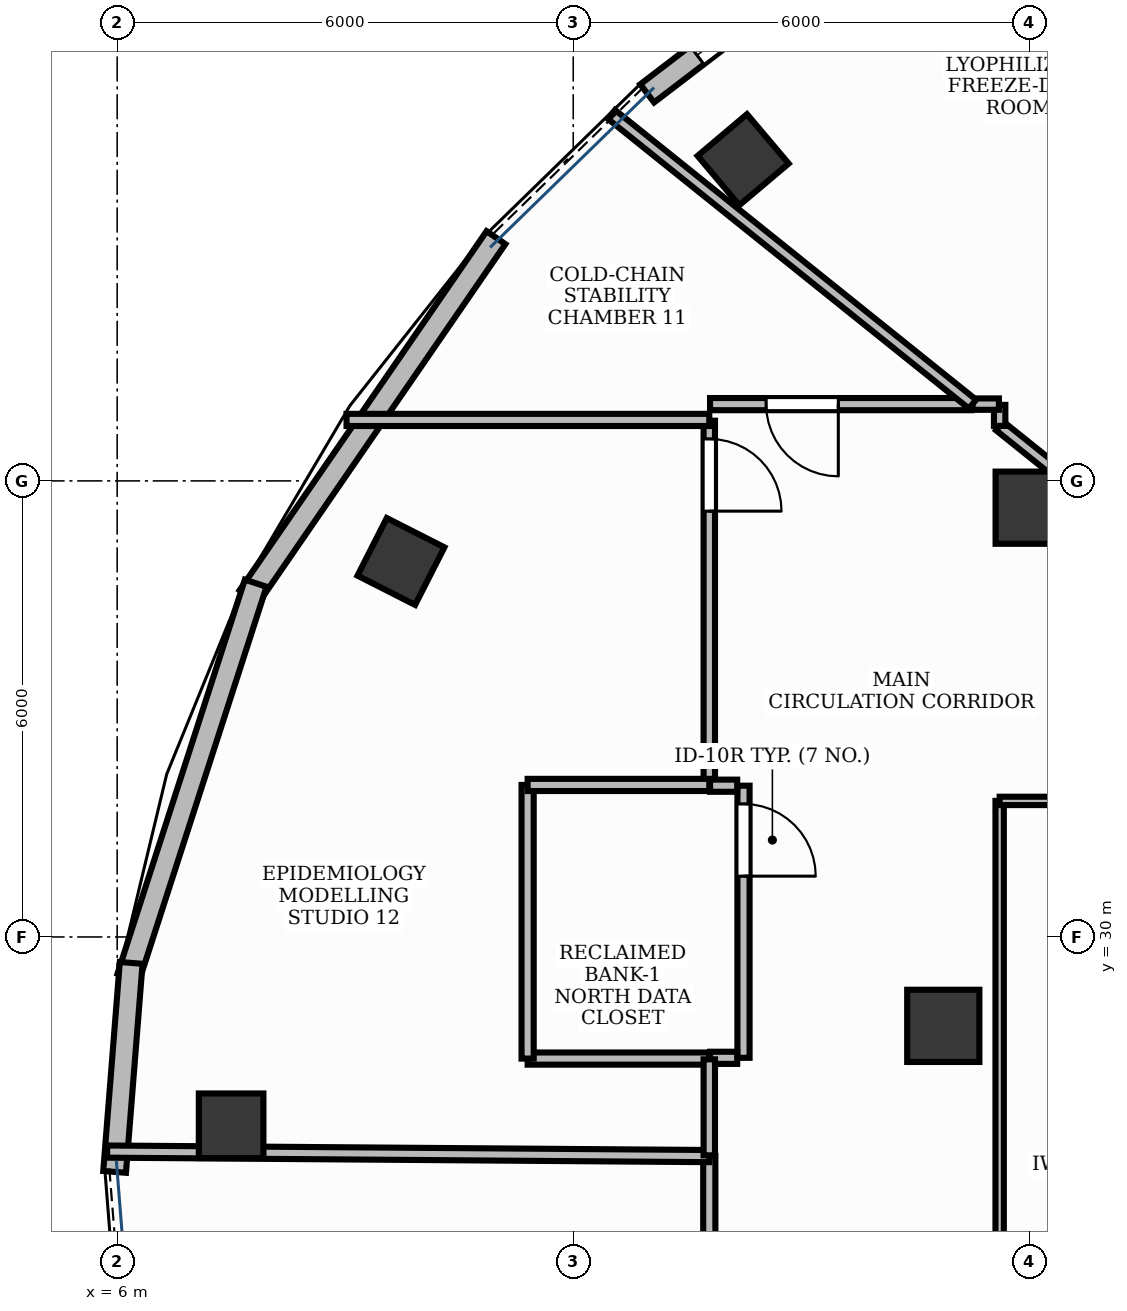
"""IFC4 building model, lengths in metres.
Left out: names, types, materials, properties, quantities, classifications, styles, units other than length and angle.
Written with IfcOpenShell. Run it as: python <this file> out.ifc"""

import sys

from ifc_helpers import new_model, si_unit, direction, frame, frame_2d, origin, origin_2d, place, context, subcontext, project, spatial, rectangle, extrude, element, fill, save


model = new_model("IFC4")
c1 = context("Model", 3, precision=1e-05, world=origin(), true_north=direction((0.0, 1.0)))
c2 = subcontext(c1, "Body", "Model", "MODEL_VIEW")
j1 = project(units=[si_unit("LENGTHUNIT", "METRE"), si_unit("PLANEANGLEUNIT", "RADIAN")], contexts=[c1])
p1 = place(None, origin())
s1 = spatial("IfcSite", under=j1, at=p1, CompositionType="ELEMENT")
p2 = place(p1, origin())
s2 = spatial("IfcBuilding", under=s1, at=p2, CompositionType="ELEMENT")
p3 = place(p2, frame((0.0, 0.0, 243.6)))
s3 = spatial("IfcBuildingStorey", under=s2, at=p3, CompositionType="ELEMENT", Elevation=243.6)
for number, where, z_axis, x_axis in (
    (1, (14.235, 40.225, -0.0), (0.0, 0.0, 1.0), (0.764, 0.645, 0.0)),
    (2, (9.733, 34.94, -0.0), (0.0, 0.0, 1.0), (0.453, 0.891, 0.0)),
):
    element("IfcColumn", number, at=place(p3, frame(where, z_axis=z_axis, x_axis=x_axis)), inside=s3, PredefinedType="COLUMN", context=c2, shape_type="SweptSolid", body=[
        extrude(rectangle(XDim=0.85, YDim=0.85, at=origin_2d()), origin(), (0.0, 0.0, 1.0), 3.901),
    ])
p4 = place(p3, frame((18.031, 35.647, -0.0), z_axis=(0.0, 0.0, 1.0), x_axis=(1.0, 0.0, 0.0)))
e3 = element("IfcColumn", 3, at=p4, inside=s3, PredefinedType="COLUMN", context=c2, shape_type="SweptSolid", body=[
    extrude(rectangle(XDim=0.95, YDim=0.95, at=origin_2d()), origin(), (0.0, 0.0, 1.0), 3.901),
])
p5 = place(p3, frame((7.499, 27.516, -0.0), z_axis=(0.0, 0.0, 1.0), x_axis=(0.0, 1.0, 0.0)))
e4 = element("IfcColumn", 4, at=p5, inside=s3, PredefinedType="COLUMN", context=c2, shape_type="SweptSolid", body=[
    extrude(rectangle(XDim=0.85, YDim=0.85, at=origin_2d()), origin(), (0.0, 0.0, 1.0), 3.901),
])
p6 = place(p3, frame((16.868, 28.83, -0.0), z_axis=(0.0, 0.0, 1.0), x_axis=(1.0, 0.0, 0.0)))
e5 = element("IfcColumn", 5, at=p6, inside=s3, PredefinedType="COLUMN", context=c2, shape_type="SweptSolid", body=[
    extrude(rectangle(XDim=0.95, YDim=0.95, at=origin_2d()), origin(), (0.0, 0.0, 1.0), 3.901),
])
p7 = place(p3, frame((15.477, 43.013, 0.0), z_axis=(0.0, 0.0, 1.0), x_axis=(-0.794379815394, -0.607421360255, 0.0)))
e6 = element("IfcWall", 6, at=p7, inside=s3, PredefinedType="STANDARD", context=c2, shape_type="SweptSolid", body=[
    extrude(rectangle(XDim=3.152, YDim=0.3, at=frame_2d((1.576, 0.0))), origin(), (0.0, 0.0, 1.0), 3.9),
])
p8 = place(p7, frame((0.826, 0.0, 0.95)))
e7 = element("IfcOpeningElement", 7, at=p8, cuts=e6, PredefinedType="OPENING", context=c2, shape_type="SweptSolid", body=[
    extrude(rectangle(XDim=1.5, YDim=1.8, at=frame_2d((0.75, 0.9))), frame((0.0, 0.165, 0.0), z_axis=(0.0, -1.0, 0.0), x_axis=(1.0, 0.0, 0.0)), (0.0, 0.0, 1.0), 0.33),
])
p9 = place(p3, frame((10.984, 39.2, 0.0), z_axis=(0.0, 0.0, 1.0), x_axis=(-0.566669772846, -0.823945003349, 0.0)))
e8 = element("IfcWall", 8, at=p9, inside=s3, PredefinedType="STANDARD", context=c2, shape_type="SweptSolid", body=[
    extrude(rectangle(XDim=5.734, YDim=0.3, at=frame_2d((2.867, 0.0))), origin(), (0.0, 0.0, 1.0), 3.47),
])
p10 = place(p3, frame((7.822, 34.654, 0.0), z_axis=(0.0, 0.0, 1.0), x_axis=(-0.307501658213, -0.951547544895, 0.0)))
e9 = element("IfcWall", 9, at=p10, inside=s3, PredefinedType="STANDARD", context=c2, shape_type="SweptSolid", body=[
    extrude(rectangle(XDim=5.447, YDim=0.3, at=frame_2d((2.724, 0.0))), origin(), (0.0, 0.0, 1.0), 3.47),
])
p11 = place(p3, frame((6.184, 29.659, 0.0), z_axis=(0.0, 0.0, 1.0), x_axis=(-0.079045093233, -0.996871041427, 0.0)))
e10 = element("IfcWall", 10, at=p11, inside=s3, PredefinedType="STANDARD", context=c2, shape_type="SweptSolid", body=[
    extrude(rectangle(XDim=2.758, YDim=0.3, at=frame_2d((1.379, 0.0))), origin(), (0.0, 0.0, 1.0), 3.47),
])
p12 = place(p3, frame((14.24, 31.99, 0.0), z_axis=(0.0, 0.0, 1.0), x_axis=(0.0, -1.0, 0.0)))
e11 = element("IfcWall", 11, at=p12, inside=s3, PredefinedType="PARTITIONING", context=c2, shape_type="SweptSolid", body=[
    extrude(rectangle(XDim=3.58, YDim=0.16, at=frame_2d((1.79, 0.0))), origin(), (0.0, 0.0, 1.0), 2.91),
])
p13 = place(p12, frame((0.24, 0.0, 0.0)))
e12 = element("IfcOpeningElement", 12, at=p13, cuts=e11, PredefinedType="OPENING", context=c2, shape_type="SweptSolid", body=[
    extrude(rectangle(XDim=0.95, YDim=2.15, at=frame_2d((0.475, 1.075))), frame((0.0, 0.095, 0.0), z_axis=(0.0, -1.0, 0.0), x_axis=(1.0, 0.0, 0.0)), (0.0, 0.0, 1.0), 0.19),
])
p14 = place(p3, frame((13.79, 27.117, 0.0), z_axis=(0.0, 0.0, 1.0), x_axis=(0.0, -1.0, 0.0)))
e13 = element("IfcWall", 13, at=p14, inside=s3, PredefinedType="PARTITIONING", context=c2, shape_type="SweptSolid", body=[
    extrude(rectangle(XDim=11.826, YDim=0.16, at=frame_2d((5.913, 0.0))), origin(), (0.0, 0.0, 1.0), 2.91),
])
p15 = place(p14, frame((5.174, 0.0, 0.0)))
e14 = element("IfcOpeningElement", 14, at=p15, cuts=e13, PredefinedType="OPENING", context=c2, shape_type="SweptSolid", body=[
    extrude(rectangle(XDim=0.95, YDim=2.15, at=frame_2d((0.475, 1.075))), frame((0.0, 0.095, 0.0), z_axis=(0.0, -1.0, 0.0), x_axis=(1.0, 0.0, 0.0)), (0.0, 0.0, 1.0), 0.19),
])
p16 = place(p3, frame((17.237, 37.01, 0.0), z_axis=(0.0, 0.0, 1.0), x_axis=(-1.0, 0.0, 0.0)))
e15 = element("IfcWall", 15, at=p16, inside=s3, PredefinedType="PARTITIONING", context=c2, shape_type="SweptSolid", body=[
    extrude(rectangle(XDim=3.437, YDim=0.16, at=frame_2d((1.718, 0.0))), origin(), (0.0, 0.0, 1.0), 2.91),
])
p17 = place(p16, frame((1.75, 0.0, 0.0)))
e16 = element("IfcOpeningElement", 16, at=p17, cuts=e15, PredefinedType="OPENING", context=c2, shape_type="SweptSolid", body=[
    extrude(rectangle(XDim=0.95, YDim=2.15, at=frame_2d((0.475, 1.075))), frame((0.0, 0.095, 0.0), z_axis=(0.0, -1.0, 0.0), x_axis=(1.0, 0.0, 0.0)), (0.0, 0.0, 1.0), 0.19),
])
p18 = place(p3, frame((13.79, 36.792, 0.0), z_axis=(0.0, 0.0, 1.0), x_axis=(0.0, -1.0, 0.0)))
e17 = element("IfcWall", 17, at=p18, inside=s3, PredefinedType="PARTITIONING", context=c2, shape_type="SweptSolid", body=[
    extrude(rectangle(XDim=4.782, YDim=0.15, at=frame_2d((2.391, 0.0))), origin(), (0.0, 0.0, 1.0), 2.91),
])
p19 = place(p18, frame((0.24, 0.0, 0.0)))
e18 = element("IfcOpeningElement", 18, at=p19, cuts=e17, PredefinedType="OPENING", context=c2, shape_type="SweptSolid", body=[
    extrude(rectangle(XDim=0.95, YDim=2.15, at=frame_2d((0.475, 1.075))), frame((0.0, 0.09, 0.0), z_axis=(0.0, -1.0, 0.0), x_axis=(1.0, 0.0, 0.0)), (0.0, 0.0, 1.0), 0.18),
])
p20 = place(p3, frame((17.61, 23.324, 0.0), z_axis=(0.0, 0.0, 1.0), x_axis=(0.0, 1.0, 0.0)))
e19 = element("IfcWall", 19, at=p20, inside=s3, PredefinedType="MOVABLE", context=c2, shape_type="SweptSolid", body=[
    extrude(rectangle(XDim=8.466, YDim=0.11, at=frame_2d((4.233, 0.0))), origin(), (0.0, 0.0, 1.0), 2.91),
])
p21 = place(p20, frame((0.481, 0.0, 0.0)))
e20 = element("IfcOpeningElement", 20, at=p21, cuts=e19, PredefinedType="OPENING", context=c2, shape_type="SweptSolid", body=[
    extrude(rectangle(XDim=0.95, YDim=2.15, at=frame_2d((0.475, 1.075))), frame((0.0, 0.07, 0.0), z_axis=(0.0, -1.0, 0.0), x_axis=(1.0, 0.0, 0.0)), (0.0, 0.0, 1.0), 0.14),
])
for number, where, z_axis, x_axis in (
    (21, (13.8, 31.99, 0.0), (0.0, 0.0, 1.0), (1.0, 0.0, 0.0)),
    (22, (14.157, 28.41, 0.0), (0.0, 0.0, 1.0), (-1.0, 0.0, 0.0)),
):
    element("IfcWall", number, at=place(p3, frame(where, z_axis=z_axis, x_axis=x_axis)), inside=s3, PredefinedType="PARTITIONING", context=c2, shape_type="SweptSolid", body=[
        extrude(rectangle(XDim=0.357, YDim=0.16, at=frame_2d((0.178, 0.0))), origin(), (0.0, 0.0, 1.0), 2.91),
    ])
p22 = place(p3, frame((13.79, 28.4, 0.0), z_axis=(0.0, 0.0, 1.0), x_axis=(-1.0, 0.0, 0.0)))
e23 = element("IfcWall", 23, at=p22, inside=s3, PredefinedType="PARTITIONING", context=c2, shape_type="SweptSolid", body=[
    extrude(rectangle(XDim=2.39, YDim=0.16, at=frame_2d((1.195, 0.0))), origin(), (0.0, 0.0, 1.0), 2.91),
])
p23 = place(p3, frame((11.4, 28.4, 0.0), z_axis=(0.0, 0.0, 1.0), x_axis=(0.0, 1.0, 0.0)))
e24 = element("IfcWall", 24, at=p23, inside=s3, PredefinedType="PARTITIONING", context=c2, shape_type="SweptSolid", body=[
    extrude(rectangle(XDim=3.6, YDim=0.16, at=frame_2d((1.8, 0.0))), origin(), (0.0, 0.0, 1.0), 2.91),
])
p24 = place(p3, frame((11.4, 32.0, 0.0), z_axis=(0.0, 0.0, 1.0), x_axis=(1.0, 0.0, 0.0)))
e25 = element("IfcWall", 25, at=p24, inside=s3, PredefinedType="PARTITIONING", context=c2, shape_type="SweptSolid", body=[
    extrude(rectangle(XDim=2.39, YDim=0.16, at=frame_2d((1.195, 0.0))), origin(), (0.0, 0.0, 1.0), 2.91),
])
p25 = place(p3, frame((5.868, 27.177, 0.0), z_axis=(0.0, 0.0, 1.0), x_axis=(0.999971961056, -0.007488464561, 0.0)))
e26 = element("IfcWall", 26, at=p25, inside=s3, PredefinedType="PARTITIONING", context=c2, shape_type="SweptSolid", body=[
    extrude(rectangle(XDim=7.922, YDim=0.16, at=frame_2d((3.961, 0.0))), origin(), (0.0, 0.0, 1.0), 2.91),
])
p26 = place(p3, frame((20.244, 34.61, 0.0), z_axis=(0.0, 0.0, 1.0), x_axis=(-0.779965134007, 0.625822969963, 0.0)))
e27 = element("IfcWall", 27, at=p26, inside=s3, PredefinedType="PARTITIONING", context=c2, shape_type="SweptSolid", body=[
    extrude(rectangle(XDim=3.377, YDim=0.15, at=frame_2d((1.688, 0.0))), origin(), (0.0, 0.0, 1.0), 2.91),
])
p27 = place(p3, frame((17.61, 36.723, 0.0), z_axis=(0.0, 0.0, 1.0), x_axis=(0.0, 1.0, 0.0)))
e28 = element("IfcWall", 28, at=p27, inside=s3, PredefinedType="PARTITIONING", context=c2, shape_type="SweptSolid", body=[
    extrude(rectangle(XDim=0.277, YDim=0.15, at=frame_2d((0.138, 0.0))), origin(), (0.0, 0.0, 1.0), 2.91),
])
p28 = place(p3, frame((17.6, 37.01, 0.0), z_axis=(0.0, 0.0, 1.0), x_axis=(-1.0, 0.0, 0.0)))
e29 = element("IfcWall", 29, at=p28, inside=s3, PredefinedType="PARTITIONING", context=c2, shape_type="SweptSolid", body=[
    extrude(rectangle(XDim=0.347, YDim=0.15, at=frame_2d((0.174, 0.0))), origin(), (0.0, 0.0, 1.0), 2.91),
])
p29 = place(p3, frame((17.253, 37.01, 0.0), z_axis=(0.0, 0.0, 1.0), x_axis=(-0.779948830135, 0.625843288987, 0.0)))
e30 = element("IfcWall", 30, at=p29, inside=s3, PredefinedType="PARTITIONING", context=c2, shape_type="SweptSolid", body=[
    extrude(rectangle(XDim=6.09, YDim=0.15, at=frame_2d((3.045, 0.0))), origin(), (0.0, 0.0, 1.0), 2.91),
])
p30 = place(p3, frame((13.79, 36.802, 0.0), z_axis=(0.0, 0.0, 1.0), x_axis=(-1.0, 0.0, 0.0)))
e31 = element("IfcWall", 31, at=p30, inside=s3, PredefinedType="PARTITIONING", context=c2, shape_type="SweptSolid", body=[
    extrude(rectangle(XDim=4.772, YDim=0.16, at=frame_2d((2.386, 0.0))), origin(), (0.0, 0.0, 1.0), 2.91),
])
p31 = place(p3, frame((13.79, 28.39, 0.0), z_axis=(0.0, 0.0, 1.0), x_axis=(0.0, -1.0, 0.0)))
e32 = element("IfcWall", 32, at=p31, inside=s3, PredefinedType="PARTITIONING", context=c2, shape_type="SweptSolid", body=[
    extrude(rectangle(XDim=1.263, YDim=0.15, at=frame_2d((0.631, 0.0))), origin(), (0.0, 0.0, 1.0), 2.91),
])
p32 = place(p3, frame((17.61, 31.79, 0.0), z_axis=(0.0, 0.0, 1.0), x_axis=(1.0, 0.0, 0.0)))
e33 = element("IfcWall", 33, at=p32, inside=s3, PredefinedType="MOVABLE", context=c2, shape_type="SweptSolid", body=[
    extrude(rectangle(XDim=1.73, YDim=0.11, at=frame_2d((0.865, 0.0))), origin(), (0.0, 0.0, 1.0), 2.91),
])
p33 = place(p8, origin())
e34 = element("IfcWindow", 34, at=p33, inside=s3, PartitioningType="DOUBLE_PANEL_VERTICAL", PredefinedType="WINDOW", context=c2, shape_type="SweptSolid", body=[
    extrude(rectangle(XDim=1.5, YDim=1.8, at=frame_2d((0.75, 0.9))), frame((0.0, 0.03, 0.0), z_axis=(0.0, -1.0, 0.0), x_axis=(1.0, 0.0, 0.0)), (0.0, 0.0, 1.0), 0.06),
])
fill(e7, e34)
p34 = place(p13, origin())
e35 = element("IfcDoor", 35, at=p34, inside=s3, OperationType="SINGLE_SWING_RIGHT", PredefinedType="DOOR", context=c2, shape_type="SweptSolid", body=[
    extrude(rectangle(XDim=0.95, YDim=2.15, at=frame_2d((0.475, 1.075))), frame((0.0, 0.025, 0.0), z_axis=(0.0, -1.0, 0.0), x_axis=(1.0, 0.0, 0.0)), (0.0, 0.0, 1.0), 0.05),
])
fill(e12, e35)
p35 = place(p17, origin())
e36 = element("IfcDoor", 36, at=p35, inside=s3, OperationType="SINGLE_SWING_LEFT", PredefinedType="DOOR", context=c2, shape_type="SweptSolid", body=[
    extrude(rectangle(XDim=0.95, YDim=2.15, at=frame_2d((0.475, 1.075))), frame((0.0, 0.025, 0.0), z_axis=(0.0, -1.0, 0.0), x_axis=(1.0, 0.0, 0.0)), (0.0, 0.0, 1.0), 0.05),
])
fill(e16, e36)
p36 = place(p19, origin())
e37 = element("IfcDoor", 37, at=p36, inside=s3, OperationType="SINGLE_SWING_RIGHT", PredefinedType="DOOR", context=c2, shape_type="SweptSolid", body=[
    extrude(rectangle(XDim=0.95, YDim=2.15, at=frame_2d((0.475, 1.075))), frame((0.0, 0.025, 0.0), z_axis=(0.0, -1.0, 0.0), x_axis=(1.0, 0.0, 0.0)), (0.0, 0.0, 1.0), 0.05),
])
fill(e18, e37)
save(model, sys.argv[1])
